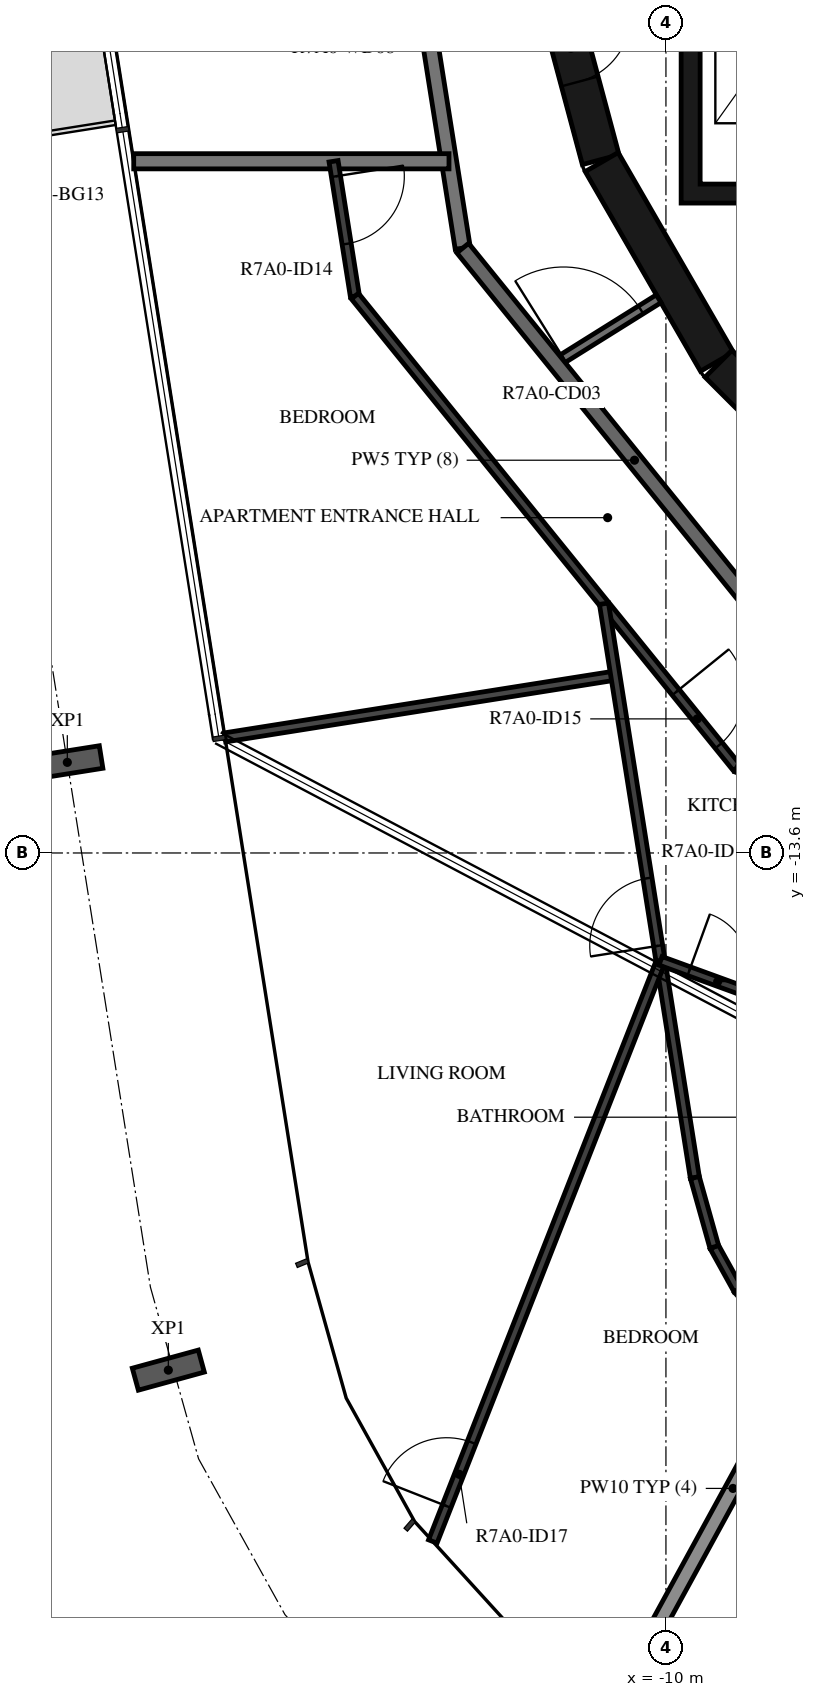
"""IFC4 building model, lengths in metres.
Left out: names, types, materials, properties, quantities, classifications, styles, units other than length and angle.
Written with IfcOpenShell. Run it as: python <this file> out.ifc"""

import sys

from ifc_helpers import new_model, si_unit, direction, frame, frame_2d, origin, origin_2d, place, context, subcontext, project, spatial, polyline, rectangle, i_section, outline, extrude, element, fill, save


model = new_model("IFC4")
c1 = context("Model", 3, precision=1e-05, world=origin(), true_north=direction((0.0, 1.0)))
c2 = subcontext(c1, "Body", "Model", "MODEL_VIEW")
j1 = project(units=[si_unit("LENGTHUNIT", "METRE"), si_unit("PLANEANGLEUNIT", "RADIAN")], contexts=[c1])
p1 = place(None, origin())
s1 = spatial("IfcSite", under=j1, at=p1, CompositionType="ELEMENT")
p2 = place(p1, origin())
s2 = spatial("IfcBuilding", under=s1, at=p2, CompositionType="ELEMENT")
p3 = place(p2, frame((0.0, 0.0, 270.4)))
s3 = spatial("IfcBuildingStorey", under=s2, at=p3, CompositionType="ELEMENT", Elevation=270.4)
for number, where, z_axis, x_axis in (
    (1, (-17.875, -12.408, -0.38), (0.0, 0.0, 1.0), (-0.156, 0.988, 0.0)),
    (2, (-16.547, -20.404, -0.38), (0.0, 0.0, 1.0), (-0.265, 0.964, 0.0)),
):
    element("IfcColumn", number, at=place(p3, frame(where, z_axis=z_axis, x_axis=x_axis)), inside=s3, PredefinedType="COLUMN", context=c2, shape_type="SweptSolid", body=[
        extrude(i_section(OverallWidth=0.3, OverallDepth=0.9, WebThickness=0.019, FlangeThickness=0.035, FilletRadius=0.03, at=origin_2d()), origin(), (0.0, 0.0, 1.0), 3.5),
    ])
p4 = place(p3, frame((-11.643, -1.55, 0.0), z_axis=(0.0, 0.0, 1.0), x_axis=(0.258734743916, -0.965948410781, 0.0)))
e3 = element("IfcWall", 3, at=p4, inside=s3, PredefinedType="SHEAR", context=c2, shape_type="SweptSolid", body=[
    extrude(rectangle(XDim=3.033, YDim=0.5, at=frame_2d((1.516, 0.0))), origin(), (0.0, 0.0, 1.0), 3.12),
])
p5 = place(p4, frame((1.066, 0.0, 0.0)))
e4 = element("IfcOpeningElement", 4, at=p5, cuts=e3, PredefinedType="OPENING", context=c2, shape_type="SweptSolid", body=[
    extrude(rectangle(XDim=0.9, YDim=2.1, at=frame_2d((0.45, 1.05))), frame((0.0, 0.26, 0.0), z_axis=(0.0, -1.0, 0.0), x_axis=(1.0, 0.0, 0.0)), (0.0, 0.0, 1.0), 0.52),
])
p6 = place(p3, frame((-10.845, -4.51, 0.0), z_axis=(0.0, 0.0, 1.0), x_axis=(0.500087131594, -0.865975092491, 0.0)))
e5 = element("IfcWall", 5, at=p6, inside=s3, PredefinedType="SHEAR", context=c2, shape_type="SweptSolid", body=[
    extrude(rectangle(XDim=3.033, YDim=0.5, at=frame_2d((1.516, 0.0))), origin(), (0.0, 0.0, 1.0), 3.12),
])
p7 = place(p3, frame((-9.308, -7.164, 0.0), z_axis=(0.0, 0.0, 1.0), x_axis=(0.707106781187, -0.707106781187, 0.0)))
e6 = element("IfcWall", 6, at=p7, inside=s3, PredefinedType="SHEAR", context=c2, shape_type="SweptSolid", body=[
    extrude(rectangle(XDim=3.032, YDim=0.5, at=frame_2d((1.516, 0.0))), origin(), (0.0, 0.0, 1.0), 3.12),
])
p8 = place(p3, origin())
e7 = element("IfcWall", 7, at=p8, inside=s3, PredefinedType="SHEAR", context=c2, shape_type="SweptSolid", body=[
    extrude(outline(polyline([(9.8, -5.05), (9.8, -4.8), (9.8, -1.9), (9.55, -1.9), (9.55, -4.8), (7.65, -4.8), (7.65, -1.9), (7.4, -1.9), (7.4, -4.8), (5.5, -4.8), (5.5, -1.9), (5.25, -1.9), (5.25, -4.8), (3.35, -4.8), (3.35, -1.9), (3.1, -1.9), (3.1, -4.8), (1.2, -4.8), (1.2, -1.9), (0.95, -1.9), (0.95, -4.8), (-0.95, -4.8), (-0.95, -1.9), (-1.2, -1.9), (-1.2, -4.8), (-3.1, -4.8), (-3.1, -1.9), (-3.35, -1.9), (-3.35, -4.8), (-5.25, -4.8), (-5.25, -1.9), (-5.5, -1.9), (-5.5, -4.8), (-7.4, -4.8), (-7.4, -1.9), (-7.65, -1.9), (-7.65, -4.8), (-9.55, -4.8), (-9.55, -1.9), (-9.8, -1.9), (-9.8, -4.8), (-9.8, -5.05), (9.8, -5.05)])), origin(), (0.0, 0.0, 1.0), 3.12),
])
p9 = place(p3, frame((-11.449, -7.154, 0.0), z_axis=(0.0, 0.0, 1.0), x_axis=(0.848067047543, 0.529888934468, 0.0)))
e8 = element("IfcWall", 8, at=p9, inside=s3, PredefinedType="PARTITIONING", context=c2, shape_type="SweptSolid", body=[
    extrude(rectangle(XDim=1.596, YDim=0.12, at=frame_2d((0.798, 0.0))), origin(), (0.0, 0.0, 1.0), 3.12),
])
p10 = place(p9, frame((0.12, 0.0, 0.0)))
e9 = element("IfcOpeningElement", 9, at=p10, cuts=e8, PredefinedType="OPENING", context=c2, shape_type="SweptSolid", body=[
    extrude(rectangle(XDim=1.2, YDim=2.1, at=frame_2d((0.6, 1.05))), frame((0.0, 0.07, 0.0), z_axis=(0.0, -1.0, 0.0), x_axis=(1.0, 0.0, 0.0)), (0.0, 0.0, 1.0), 0.14),
])
p11 = place(p3, frame((-13.797, 1.45, 0.0), z_axis=(0.0, 0.0, 1.0), x_axis=(0.156421704315, -0.987690361611, 0.0)))
e10 = element("IfcWall", 10, at=p11, inside=s3, PredefinedType="STANDARD", context=c2, shape_type="SweptSolid", body=[
    extrude(rectangle(XDim=7.181, YDim=0.2, at=frame_2d((3.591, 0.0))), origin(), (0.0, 0.0, 1.0), 3.12),
])
p12 = place(p3, frame((-12.673, -5.643, 0.0), z_axis=(0.0, 0.0, 1.0), x_axis=(0.629302871585, -0.777160148113, 0.0)))
e11 = element("IfcWall", 11, at=p12, inside=s3, PredefinedType="STANDARD", context=c2, shape_type="SweptSolid", body=[
    extrude(rectangle(XDim=7.181, YDim=0.2, at=frame_2d((3.59, 0.0))), origin(), (0.0, 0.0, 1.0), 3.12),
])
p13 = place(p3, frame((-17.002, -4.5, 0.0), z_axis=(0.0, 0.0, 1.0), x_axis=(1.0, 0.0, 0.0)))
e12 = element("IfcWall", 12, at=p13, inside=s3, PredefinedType="STANDARD", context=c2, shape_type="SweptSolid", body=[
    extrude(rectangle(XDim=4.148, YDim=0.2, at=frame_2d((2.074, 0.0))), origin(), (0.0, 0.0, 1.0), 3.12),
])
p14 = place(p3, frame((-10.637, -24.738, 0.0), z_axis=(0.0, 0.0, 1.0), x_axis=(0.479683887596, 0.877441375808, 0.0)))
e13 = element("IfcWall", 13, at=p14, inside=s3, PredefinedType="STANDARD", context=c2, shape_type="SweptSolid", body=[
    extrude(rectangle(XDim=6.333, YDim=0.2, at=frame_2d((3.166, 0.0))), origin(), (0.0, 0.0, 1.0), 2.73),
])
p15 = place(p3, frame((-14.373, -4.5, 0.0), z_axis=(0.0, 0.0, 1.0), x_axis=(0.156437152886, -0.987687914878, 0.0)))
e14 = element("IfcWall", 14, at=p15, inside=s3, PredefinedType="PARTITIONING", context=c2, shape_type="SweptSolid", body=[
    extrude(rectangle(XDim=1.796, YDim=0.12, at=frame_2d((0.898, 0.0))), origin(), (0.0, 0.0, 1.0), 3.12),
])
p16 = place(p15, frame((0.2, 0.0, 0.0)))
e15 = element("IfcOpeningElement", 15, at=p16, cuts=e14, PredefinedType="OPENING", context=c2, shape_type="SweptSolid", body=[
    extrude(rectangle(XDim=0.9, YDim=2.1, at=frame_2d((0.45, 1.05))), frame((0.0, 0.07, 0.0), z_axis=(0.0, -1.0, 0.0), x_axis=(1.0, 0.0, 0.0)), (0.0, 0.0, 1.0), 0.14),
])
p17 = place(p3, frame((-14.092, -6.274, 0.0), z_axis=(0.0, 0.0, 1.0), x_axis=(0.62933367237, -0.777135206268, 0.0)))
e16 = element("IfcWall", 16, at=p17, inside=s3, PredefinedType="PARTITIONING", context=c2, shape_type="SweptSolid", body=[
    extrude(rectangle(XDim=7.985, YDim=0.12, at=frame_2d((3.992, 0.0))), origin(), (0.0, 0.0, 1.0), 3.12),
])
p18 = place(p17, frame((6.707, 0.0, 0.0)))
e17 = element("IfcOpeningElement", 17, at=p18, cuts=e16, PredefinedType="OPENING", context=c2, shape_type="SweptSolid", body=[
    extrude(rectangle(XDim=0.9, YDim=2.1, at=frame_2d((0.45, 1.05))), frame((0.0, 0.07, 0.0), z_axis=(0.0, -1.0, 0.0), x_axis=(1.0, 0.0, 0.0)), (0.0, 0.0, 1.0), 0.14),
])
p19 = place(p3, frame((-9.067, -12.479, 0.0), z_axis=(0.0, 0.0, 1.0), x_axis=(0.933579449035, -0.358370495911, 0.0)))
e18 = element("IfcWall", 18, at=p19, inside=s3, PredefinedType="PARTITIONING", context=c2, shape_type="SweptSolid", body=[
    extrude(rectangle(XDim=7.985, YDim=0.12, at=frame_2d((3.992, 0.0))), origin(), (0.0, 0.0, 1.0), 3.12),
])
p20 = place(p19, frame((4.192, 0.0, 0.0)))
e19 = element("IfcOpeningElement", 19, at=p20, cuts=e18, PredefinedType="OPENING", context=c2, shape_type="SweptSolid", body=[
    extrude(rectangle(XDim=0.9, YDim=2.1, at=frame_2d((0.45, 1.05))), frame((0.0, 0.07, 0.0), z_axis=(0.0, -1.0, 0.0), x_axis=(1.0, 0.0, 0.0)), (0.0, 0.0, 1.0), 0.14),
])
p21 = place(p3, frame((-15.802, -12.08, 0.0), z_axis=(0.0, 0.0, 1.0), x_axis=(0.987687857978, 0.156437512135, 0.0)))
e20 = element("IfcWall", 20, at=p21, inside=s3, PredefinedType="PARTITIONING", context=c2, shape_type="SweptSolid", body=[
    extrude(rectangle(XDim=5.2, YDim=0.12, at=frame_2d((2.6, 0.0))), origin(), (0.0, 0.0, 1.0), 2.73),
])
p22 = place(p3, frame((-9.619, -17.871, 0.0), z_axis=(0.0, 0.0, 1.0), x_axis=(-0.156433255633, 0.987688532146, 0.0)))
e21 = element("IfcWall", 21, at=p22, inside=s3, PredefinedType="PARTITIONING", context=c2, shape_type="SweptSolid", body=[
    extrude(rectangle(XDim=7.644, YDim=0.12, at=frame_2d((3.822, 0.0))), origin(), (0.0, 0.0, 1.0), 3.12),
])
p23 = place(p22, frame((3.087, 0.0, 0.0)))
e22 = element("IfcOpeningElement", 22, at=p23, cuts=e21, PredefinedType="OPENING", context=c2, shape_type="SweptSolid", body=[
    extrude(rectangle(XDim=0.9, YDim=2.1, at=frame_2d((0.45, 1.05))), frame((0.0, 0.07, 0.0), z_axis=(0.0, -1.0, 0.0), x_axis=(1.0, 0.0, 0.0)), (0.0, 0.0, 1.0), 0.14),
])
p24 = place(p3, frame((-13.067, -22.658, 0.0), z_axis=(0.0, 0.0, 1.0), x_axis=(0.365785999331, 0.930698986082, 0.0)))
e23 = element("IfcWall", 23, at=p24, inside=s3, PredefinedType="PARTITIONING", context=c2, shape_type="SweptSolid", body=[
    extrude(rectangle(XDim=8.196, YDim=0.12, at=frame_2d((4.098, 0.0))), origin(), (0.0, 0.0, 1.0), 3.12),
])
p25 = place(p24, frame((0.5, 0.0, 0.0)))
e24 = element("IfcOpeningElement", 24, at=p25, cuts=e23, PredefinedType="OPENING", context=c2, shape_type="SweptSolid", body=[
    extrude(rectangle(XDim=0.9, YDim=2.1, at=frame_2d((0.45, 1.05))), frame((0.0, 0.07, 0.0), z_axis=(0.0, -1.0, 0.0), x_axis=(1.0, 0.0, 0.0)), (0.0, 0.0, 1.0), 0.14),
])
p26 = place(p3, frame((-10.071, -15.019, 0.0), z_axis=(0.0, 0.0, 1.0), x_axis=(0.939648507355, -0.34214131967, 0.0)))
e25 = element("IfcWall", 25, at=p26, inside=s3, PredefinedType="PARTITIONING", context=c2, shape_type="SweptSolid", body=[
    extrude(rectangle(XDim=3.691, YDim=0.12, at=frame_2d((1.846, 0.0))), origin(), (0.0, 0.0, 1.0), 3.12),
])
p27 = place(p26, frame((0.4, 0.0, 0.0)))
e26 = element("IfcOpeningElement", 26, at=p27, cuts=e25, PredefinedType="OPENING", context=c2, shape_type="SweptSolid", body=[
    extrude(rectangle(XDim=0.8, YDim=2.1, at=frame_2d((0.4, 1.05))), frame((0.0, 0.07, 0.0), z_axis=(0.0, -1.0, 0.0), x_axis=(1.0, 0.0, 0.0)), (0.0, 0.0, 1.0), 0.14),
])
for number, where, z_axis, x_axis in (
    (27, (-8.62, -19.818, 0.0), (0.0, 0.0, 1.0), (-0.673, 0.739, 0.0)),
    (28, (-9.052, -19.344, 0.0), (0.0, 0.0, 1.0), (-0.485, 0.874, 0.0)),
):
    element("IfcWall", number, at=place(p3, frame(where, z_axis=z_axis, x_axis=x_axis)), inside=s3, PredefinedType="PARTITIONING", context=c2, shape_type="SweptSolid", body=[
        extrude(rectangle(XDim=0.642, YDim=0.12, at=frame_2d((0.321, 0.0))), origin(), (0.0, 0.0, 1.0), 3.12),
    ])
p28 = place(p3, frame((-9.364, -18.782, 0.0), z_axis=(0.0, 0.0, 1.0), x_axis=(-0.269811707714, 0.962913102196, 0.0)))
e29 = element("IfcWall", 29, at=p28, inside=s3, PredefinedType="PARTITIONING", context=c2, shape_type="SweptSolid", body=[
    extrude(rectangle(XDim=0.947, YDim=0.12, at=frame_2d((0.473, 0.0))), origin(), (0.0, 0.0, 1.0), 3.12),
])
p29 = place(p5, origin())
e30 = element("IfcDoor", 30, at=p29, inside=s3, OperationType="SINGLE_SWING_RIGHT", PredefinedType="DOOR", context=c2, shape_type="SweptSolid", body=[
    extrude(rectangle(XDim=0.9, YDim=2.1, at=frame_2d((0.45, 1.05))), frame((0.0, 0.025, 0.0), z_axis=(0.0, -1.0, 0.0), x_axis=(1.0, 0.0, 0.0)), (0.0, 0.0, 1.0), 0.05),
])
fill(e4, e30)
p30 = place(p16, origin())
e31 = element("IfcDoor", 31, at=p30, inside=s3, OperationType="SINGLE_SWING_RIGHT", PredefinedType="DOOR", context=c2, shape_type="SweptSolid", body=[
    extrude(rectangle(XDim=0.9, YDim=2.1, at=frame_2d((0.45, 1.05))), frame((0.0, 0.025, 0.0), z_axis=(0.0, -1.0, 0.0), x_axis=(1.0, 0.0, 0.0)), (0.0, 0.0, 1.0), 0.05),
])
fill(e15, e31)
p31 = place(p18, origin())
e32 = element("IfcDoor", 32, at=p31, inside=s3, OperationType="SINGLE_SWING_RIGHT", PredefinedType="DOOR", context=c2, shape_type="SweptSolid", body=[
    extrude(rectangle(XDim=0.9, YDim=2.1, at=frame_2d((0.45, 1.05))), frame((0.0, 0.025, 0.0), z_axis=(0.0, -1.0, 0.0), x_axis=(1.0, 0.0, 0.0)), (0.0, 0.0, 1.0), 0.05),
])
fill(e17, e32)
p32 = place(p23, origin())
e33 = element("IfcDoor", 33, at=p32, inside=s3, OperationType="SINGLE_SWING_RIGHT", PredefinedType="DOOR", context=c2, shape_type="SweptSolid", body=[
    extrude(rectangle(XDim=0.9, YDim=2.1, at=frame_2d((0.45, 1.05))), frame((0.0, 0.025, 0.0), z_axis=(0.0, -1.0, 0.0), x_axis=(1.0, 0.0, 0.0)), (0.0, 0.0, 1.0), 0.05),
])
fill(e22, e33)
p33 = place(p25, origin())
e34 = element("IfcDoor", 34, at=p33, inside=s3, OperationType="SINGLE_SWING_RIGHT", PredefinedType="DOOR", context=c2, shape_type="SweptSolid", body=[
    extrude(rectangle(XDim=0.9, YDim=2.1, at=frame_2d((0.45, 1.05))), frame((0.0, 0.025, 0.0), z_axis=(0.0, -1.0, 0.0), x_axis=(1.0, 0.0, 0.0)), (0.0, 0.0, 1.0), 0.05),
])
fill(e24, e34)
p34 = place(p27, origin())
e35 = element("IfcDoor", 35, at=p34, inside=s3, OperationType="SINGLE_SWING_RIGHT", PredefinedType="DOOR", context=c2, shape_type="SweptSolid", body=[
    extrude(rectangle(XDim=0.8, YDim=2.1, at=frame_2d((0.4, 1.05))), frame((0.0, 0.025, 0.0), z_axis=(0.0, -1.0, 0.0), x_axis=(1.0, 0.0, 0.0)), (0.0, 0.0, 1.0), 0.05),
])
fill(e26, e35)
p35 = place(p10, origin())
e36 = element("IfcDoor", 36, at=p35, inside=s3, OperationType="DOUBLE_DOOR_SINGLE_SWING", PredefinedType="DOOR", context=c2, shape_type="SweptSolid", body=[
    extrude(rectangle(XDim=1.2, YDim=2.1, at=frame_2d((0.6, 1.05))), frame((0.0, 0.025, 0.0), z_axis=(0.0, -1.0, 0.0), x_axis=(1.0, 0.0, 0.0)), (0.0, 0.0, 1.0), 0.05),
])
fill(e9, e36)
save(model, sys.argv[1])
